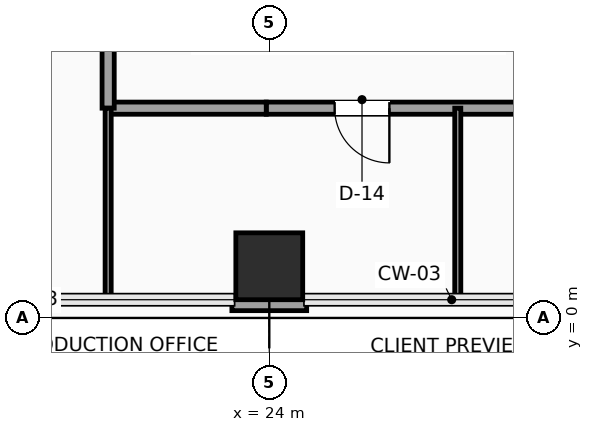
"""IFC4 building model, lengths in metres.
Left out: names, types, materials, properties, quantities, classifications, styles, units other than length and angle.
Written with IfcOpenShell. Run it as: python <this file> out.ifc"""

import sys

from ifc_helpers import new_model, si_unit, direction, frame, frame_2d, origin, origin_2d, place, context, subcontext, project, spatial, rectangle, extrude, element, fill, save


model = new_model("IFC4")
c1 = context("Model", 3, precision=1e-05, world=origin(), true_north=direction((0.0, 1.0)))
c2 = subcontext(c1, "Body", "Model", "MODEL_VIEW")
j1 = project(units=[si_unit("LENGTHUNIT", "METRE"), si_unit("PLANEANGLEUNIT", "RADIAN")], contexts=[c1])
p1 = place(None, origin())
s1 = spatial("IfcSite", under=j1, at=p1, CompositionType="ELEMENT")
p2 = place(p1, origin())
s2 = spatial("IfcBuilding", under=s1, at=p2, CompositionType="ELEMENT")
p3 = place(p2, frame((0.0, 0.0, 138.15)))
s3 = spatial("IfcBuildingStorey", under=s2, at=p3, CompositionType="ELEMENT", Elevation=138.15)
p4 = place(p3, frame((24.0, 0.85, 0.0), z_axis=(0.0, 0.0, 1.0), x_axis=(1.0, 0.0, 0.0)))
e1 = element("IfcColumn", 1, at=p4, inside=s3, PredefinedType="COLUMN", context=c2, shape_type="SweptSolid", body=[
    extrude(rectangle(XDim=1.1, YDim=1.1, at=origin_2d()), origin(), (0.0, 0.0, 1.0), 3.75),
])
p5 = place(p3, frame((24.615, 0.24, 0.0), z_axis=(0.0, 0.0, 1.0), x_axis=(-1.0, 0.0, 0.0)))
e2 = element("IfcWall", 2, at=p5, inside=s3, PredefinedType="SOLIDWALL", context=c2, shape_type="SweptSolid", body=[
    extrude(rectangle(XDim=1.23, YDim=0.24, at=frame_2d((0.615, 0.0))), origin(), (0.0, 0.0, 1.0), 3.525),
])
p6 = place(p3, frame((36.15, 3.45, 0.0), z_axis=(0.0, 0.0, 1.0), x_axis=(-1.0, 0.0, 0.0)))
e3 = element("IfcWall", 3, at=p6, inside=s3, PredefinedType="PARTITIONING", context=c2, shape_type="SweptSolid", body=[
    extrude(rectangle(XDim=12.2, YDim=0.2, at=frame_2d((6.1, 0.0))), origin(), (0.0, 0.0, 1.0), 3.067),
])
p7 = place(p6, frame((10.175, 0.0, 0.0)))
e4 = element("IfcOpeningElement", 4, at=p7, cuts=e3, PredefinedType="OPENING", context=c2, shape_type="SweptSolid", body=[
    extrude(rectangle(XDim=0.9, YDim=2.1, at=frame_2d((0.45, 1.05))), frame((0.0, 0.11, 0.0), z_axis=(0.0, -1.0, 0.0), x_axis=(1.0, 0.0, 0.0)), (0.0, 0.0, 1.0), 0.22),
])
p8 = place(p6, frame((5.75, 0.0, 0.0)))
e5 = element("IfcOpeningElement", 5, at=p8, cuts=e3, PredefinedType="OPENING", context=c2, shape_type="SweptSolid", body=[
    extrude(rectangle(XDim=0.9, YDim=2.1, at=frame_2d((0.45, 1.05))), frame((0.0, 0.11, 0.0), z_axis=(0.0, -1.0, 0.0), x_axis=(1.0, 0.0, 0.0)), (0.0, 0.0, 1.0), 0.22),
])
p9 = place(p3, frame((23.95, 3.45, 0.0), z_axis=(0.0, 0.0, 1.0), x_axis=(-1.0, 0.0, 0.0)))
e6 = element("IfcWall", 6, at=p9, inside=s3, PredefinedType="PARTITIONING", context=c2, shape_type="SweptSolid", body=[
    extrude(rectangle(XDim=2.6, YDim=0.2, at=frame_2d((1.3, 0.0))), origin(), (0.0, 0.0, 1.0), 3.067),
])
p10 = place(p3, frame((21.35, 3.45, 0.0), z_axis=(0.0, 0.0, 1.0), x_axis=(0.0, 1.0, 0.0)))
e7 = element("IfcWall", 7, at=p10, inside=s3, PredefinedType="PARTITIONING", context=c2, shape_type="SweptSolid", body=[
    extrude(rectangle(XDim=2.35, YDim=0.2, at=frame_2d((1.175, 0.0))), origin(), (0.0, 0.0, 1.0), 3.525),
])
for number, where, z_axis, x_axis in (
    (8, (21.35, 0.3, 0.0), (0.0, 0.0, 1.0), (0.0, 1.0, 0.0)),
    (9, (27.1, 0.3, 0.0), (0.0, 0.0, 1.0), (0.0, 1.0, 0.0)),
):
    element("IfcWall", number, at=place(p3, frame(where, z_axis=z_axis, x_axis=x_axis)), inside=s3, PredefinedType="PARTITIONING", context=c2, shape_type="SweptSolid", body=[
        extrude(rectangle(XDim=3.15, YDim=0.1, at=frame_2d((1.575, 0.0))), origin(), (0.0, 0.0, 1.0), 3.525),
    ])
p11 = place(p7, origin())
e10 = element("IfcDoor", 10, at=p11, inside=s3, OperationType="SINGLE_SWING_LEFT", PredefinedType="DOOR", context=c2, shape_type="SweptSolid", body=[
    extrude(rectangle(XDim=0.9, YDim=2.1, at=frame_2d((0.45, 1.05))), frame((0.0, 0.025, 0.0), z_axis=(0.0, -1.0, 0.0), x_axis=(1.0, 0.0, 0.0)), (0.0, 0.0, 1.0), 0.05),
])
fill(e4, e10)
save(model, sys.argv[1])
